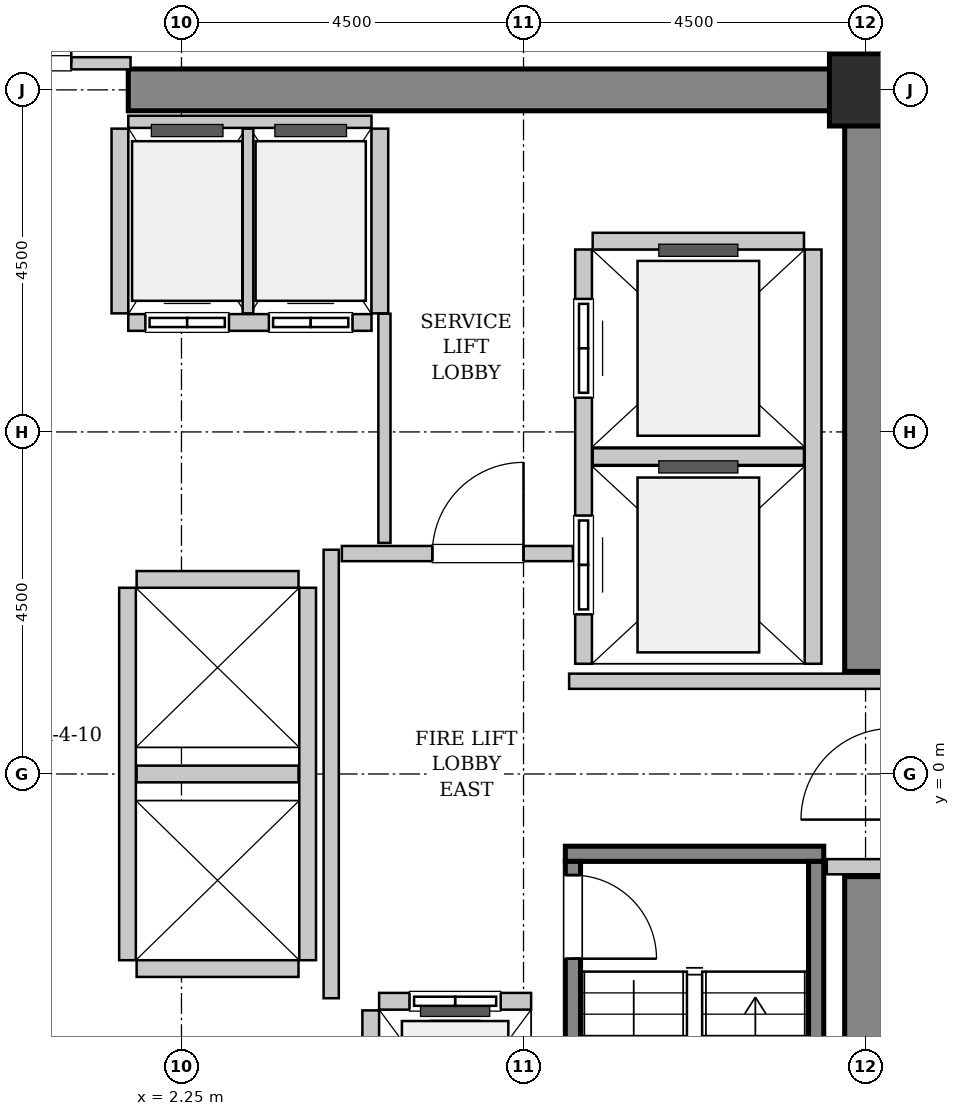
"""IFC4 building model, lengths in metres.
Left out: names, types, materials, properties, quantities, classifications, styles, units other than length and angle.
Written with IfcOpenShell. Run it as: python <this file> out.ifc"""

import sys

from ifc_helpers import new_model, si_unit, direction, frame, frame_2d, origin, origin_2d, place, context, subcontext, project, spatial, rectangle, hollow_rectangle, extrude, source, transform, mapped, element, fill, save


model = new_model("IFC4")
c1 = context("Model", 3, precision=1e-05, world=origin(), true_north=direction((0.0, 1.0)))
c2 = subcontext(c1, "Body", "Model", "MODEL_VIEW")
j1 = project(units=[si_unit("LENGTHUNIT", "METRE"), si_unit("PLANEANGLEUNIT", "RADIAN")], contexts=[c1])
p1 = place(None, origin())
s1 = spatial("IfcSite", under=j1, at=p1, CompositionType="ELEMENT")
p2 = place(p1, origin())
s2 = spatial("IfcBuilding", under=s1, at=p2, CompositionType="ELEMENT")
p3 = place(p2, frame((0.0, 0.0, 98.4)))
s3 = spatial("IfcBuildingStorey", under=s2, at=p3, CompositionType="ELEMENT", Elevation=98.4)
m1 = source(origin(), c2, "Body", "SweptSolid", [
    extrude(rectangle(XDim=9.975, YDim=0.55, at=frame_2d((4.987, 0.0))), origin(), (0.0, 0.0, 1.0), 3.8),
])
p4 = place(p3, frame((1.55, 9.0, 0.0), z_axis=(0.0, 0.0, 1.0), x_axis=(1.0, 0.0, 0.0)))
e1 = element("IfcWall", 1, at=p4, inside=s3, PredefinedType="SHEAR", context=c2, shape_type="MappedRepresentation", body=[
    mapped(m1, transform((0.0, 0.0, 0.0), x_axis=(1.0, 0.0, 0.0), y_axis=(0.0, 1.0, 0.0), z_axis=(0.0, 0.0, 1.0), scale=1.0)),
])
m2 = source(origin(), c2, "Body", "SweptSolid", [
    extrude(rectangle(XDim=7.375, YDim=0.55, at=frame_2d((3.688, 0.0))), origin(), (0.0, 0.0, 1.0), 3.8),
])
for number, where, z_axis, x_axis in (
    (2, (11.25, -8.725, 0.0), (0.0, 0.0, 1.0), (0.0, 1.0, 0.0)),
    (3, (11.25, 1.35, 0.0), (0.0, 0.0, 1.0), (0.0, 1.0, 0.0)),
):
    element("IfcWall", number, at=place(p3, frame(where, z_axis=z_axis, x_axis=x_axis)), inside=s3, PredefinedType="SHEAR", context=c2, shape_type="MappedRepresentation", body=[
        mapped(m2, transform((0.0, 0.0, 0.0), x_axis=(1.0, 0.0, 0.0), y_axis=(0.0, 1.0, 0.0), z_axis=(0.0, 0.0, 1.0), scale=1.0)),
    ])
m3 = source(origin(), c2, "Body", "SweptSolid", [
    extrude(hollow_rectangle(XDim=0.95, YDim=0.95, WallThickness=0.045, InnerFilletRadius=0.045, OuterFilletRadius=0.09, at=origin_2d()), origin(), (0.0, 0.0, 1.0), 3.8),
])
p5 = place(p3, frame((11.25, 9.0, 0.0), z_axis=(0.0, 0.0, 1.0), x_axis=(1.0, 0.0, 0.0)))
e4 = element("IfcColumn", 4, at=p5, inside=s3, PredefinedType="COLUMN", context=c2, shape_type="MappedRepresentation", body=[
    mapped(m3, transform((0.0, 0.0, 0.0), x_axis=(1.0, 0.0, 0.0), y_axis=(0.0, 1.0, 0.0), z_axis=(0.0, 0.0, 1.0), scale=1.0)),
])
m4 = source(origin(), c2, "Body", "SweptSolid", [
    extrude(rectangle(XDim=3.4, YDim=0.2, at=frame_2d((1.7, 0.0))), origin(), (0.0, 0.0, 1.0), 3.8),
])
p6 = place(p3, frame((7.3, -1.05, 0.0), z_axis=(0.0, 0.0, 1.0), x_axis=(1.0, 0.0, 0.0)))
e5 = element("IfcWall", 5, at=p6, inside=s3, PredefinedType="SOLIDWALL", context=c2, shape_type="MappedRepresentation", body=[
    mapped(m4, transform((0.0, 0.0, 0.0), x_axis=(1.0, 0.0, 0.0), y_axis=(0.0, 1.0, 0.0), z_axis=(0.0, 0.0, 1.0), scale=1.0)),
])
m5 = source(origin(), c2, "Body", "SweptSolid", [
    extrude(rectangle(XDim=7.1, YDim=0.2, at=frame_2d((3.55, 0.0))), origin(), (0.0, 0.0, 1.0), 3.8),
])
p7 = place(p3, frame((7.4, -1.15, 0.0), z_axis=(0.0, 0.0, 1.0), x_axis=(0.0, -1.0, 0.0)))
e6 = element("IfcWall", 6, at=p7, inside=s3, PredefinedType="SOLIDWALL", context=c2, shape_type="MappedRepresentation", body=[
    mapped(m5, transform((0.0, 0.0, 0.0), x_axis=(1.0, 0.0, 0.0), y_axis=(0.0, 1.0, 0.0), z_axis=(0.0, 0.0, 1.0), scale=1.0)),
])
p8 = place(p7, frame((0.18, 0.0, 0.0)))
e7 = element("IfcOpeningElement", 7, at=p8, cuts=e6, PredefinedType="OPENING", context=c2, shape_type="SweptSolid", body=[
    extrude(rectangle(XDim=1.1, YDim=2.15, at=frame_2d((0.55, 1.075))), frame((0.0, 0.11, 0.0), z_axis=(0.0, -1.0, 0.0), x_axis=(1.0, 0.0, 0.0)), (0.0, 0.0, 1.0), 0.22),
])
p9 = place(p3, frame((10.6, -1.15, 0.0), z_axis=(0.0, 0.0, 1.0), x_axis=(0.0, -1.0, 0.0)))
e8 = element("IfcWall", 8, at=p9, inside=s3, PredefinedType="SOLIDWALL", context=c2, shape_type="MappedRepresentation", body=[
    mapped(m5, transform((0.0, 0.0, 0.0), x_axis=(1.0, 0.0, 0.0), y_axis=(0.0, 1.0, 0.0), z_axis=(0.0, 0.0, 1.0), scale=1.0)),
])
m6 = source(origin(), c2, "Body", "SweptSolid", [
    extrude(rectangle(XDim=2.0, YDim=0.22, at=frame_2d((1.0, 0.0))), origin(), (0.0, 0.0, 1.0), 3.535),
])
p10 = place(p3, frame((6.85, -2.99, 0.0), z_axis=(0.0, 0.0, 1.0), x_axis=(-1.0, 0.0, 0.0)))
e9 = element("IfcWall", 9, at=p10, inside=s3, PredefinedType="SOLIDWALL", context=c2, shape_type="MappedRepresentation", body=[
    mapped(m6, transform((0.0, 0.0, 0.0), x_axis=(1.0, 0.0, 0.0), y_axis=(0.0, 1.0, 0.0), z_axis=(0.0, 0.0, 1.0), scale=1.0)),
])
p11 = place(p10, frame((0.4, 0.0, 0.0)))
e10 = element("IfcOpeningElement", 10, at=p11, cuts=e9, PredefinedType="OPENING", context=c2, shape_type="SweptSolid", body=[
    extrude(rectangle(XDim=1.2, YDim=2.2, at=frame_2d((0.6, 1.1))), frame((0.0, 0.12, 0.0), z_axis=(0.0, -1.0, 0.0), x_axis=(1.0, 0.0, 0.0)), (0.0, 0.0, 1.0), 0.24),
])
m7 = source(origin(), c2, "Body", "SweptSolid", [
    extrude(rectangle(XDim=2.68, YDim=0.22, at=frame_2d((1.34, 0.0))), origin(), (0.0, 0.0, 1.0), 3.535),
])
p12 = place(p3, frame((4.74, -3.11, 0.0), z_axis=(0.0, 0.0, 1.0), x_axis=(0.0, -1.0, 0.0)))
e11 = element("IfcWall", 11, at=p12, inside=s3, PredefinedType="SOLIDWALL", context=c2, shape_type="MappedRepresentation", body=[
    mapped(m7, transform((0.0, 0.0, 0.0), x_axis=(1.0, 0.0, 0.0), y_axis=(0.0, 1.0, 0.0), z_axis=(0.0, 0.0, 1.0), scale=1.0)),
])
m8 = source(origin(), c2, "Body", "SweptSolid", [
    extrude(rectangle(XDim=5.45, YDim=0.22, at=frame_2d((2.725, 0.0))), origin(), (0.0, 0.0, 1.0), 3.535),
])
p13 = place(p3, frame((7.54, 6.9, 0.0), z_axis=(0.0, 0.0, 1.0), x_axis=(0.0, -1.0, 0.0)))
e12 = element("IfcWall", 12, at=p13, inside=s3, PredefinedType="SOLIDWALL", context=c2, shape_type="MappedRepresentation", body=[
    mapped(m8, transform((0.0, 0.0, 0.0), x_axis=(1.0, 0.0, 0.0), y_axis=(0.0, 1.0, 0.0), z_axis=(0.0, 0.0, 1.0), scale=1.0)),
])
p14 = place(p13, frame((3.5, 0.0, 0.0)))
e13 = element("IfcOpeningElement", 13, at=p14, cuts=e12, PredefinedType="OPENING", context=c2, shape_type="SweptSolid", body=[
    extrude(rectangle(XDim=1.3, YDim=2.3, at=frame_2d((0.65, 1.15))), frame((0.0, 0.12, 0.0), z_axis=(0.0, -1.0, 0.0), x_axis=(1.0, 0.0, 0.0)), (0.0, 0.0, 1.0), 0.24),
])
p15 = place(p13, frame((0.65, 0.0, 0.0)))
e14 = element("IfcOpeningElement", 14, at=p15, cuts=e12, PredefinedType="OPENING", context=c2, shape_type="SweptSolid", body=[
    extrude(rectangle(XDim=1.3, YDim=2.3, at=frame_2d((0.65, 1.15))), frame((0.0, 0.12, 0.0), z_axis=(0.0, -1.0, 0.0), x_axis=(1.0, 0.0, 0.0)), (0.0, 0.0, 1.0), 0.24),
])
p16 = place(p3, frame((10.56, 1.45, 0.0), z_axis=(0.0, 0.0, 1.0), x_axis=(0.0, 1.0, 0.0)))
e15 = element("IfcWall", 15, at=p16, inside=s3, PredefinedType="SOLIDWALL", context=c2, shape_type="MappedRepresentation", body=[
    mapped(m8, transform((0.0, 0.0, 0.0), x_axis=(1.0, 0.0, 0.0), y_axis=(0.0, 1.0, 0.0), z_axis=(0.0, 0.0, 1.0), scale=1.0)),
])
m9 = source(origin(), c2, "Body", "SweptSolid", [
    extrude(rectangle(XDim=2.78, YDim=0.22, at=frame_2d((1.39, 0.0))), origin(), (0.0, 0.0, 1.0), 3.535),
])
for number, where, z_axis, x_axis in (
    (16, (7.66, 4.175, 0.0), (0.0, 0.0, 1.0), (1.0, 0.0, 0.0)),
    (17, (10.44, 7.01, 0.0), (0.0, 0.0, 1.0), (-1.0, 0.0, 0.0)),
):
    element("IfcWall", number, at=place(p3, frame(where, z_axis=z_axis, x_axis=x_axis)), inside=s3, PredefinedType="SOLIDWALL", context=c2, shape_type="MappedRepresentation", body=[
        mapped(m9, transform((0.0, 0.0, 0.0), x_axis=(1.0, 0.0, 0.0), y_axis=(0.0, 1.0, 0.0), z_axis=(0.0, 0.0, 1.0), scale=1.0)),
    ])
m10 = source(origin(), c2, "Body", "SweptSolid", [
    extrude(rectangle(XDim=3.2, YDim=0.22, at=frame_2d((1.6, 0.0))), origin(), (0.0, 0.0, 1.0), 3.535),
])
p17 = place(p3, frame((1.55, 5.94, 0.0), z_axis=(0.0, 0.0, 1.0), x_axis=(1.0, 0.0, 0.0)))
e18 = element("IfcWall", 18, at=p17, inside=s3, PredefinedType="SOLIDWALL", context=c2, shape_type="MappedRepresentation", body=[
    mapped(m10, transform((0.0, 0.0, 0.0), x_axis=(1.0, 0.0, 0.0), y_axis=(0.0, 1.0, 0.0), z_axis=(0.0, 0.0, 1.0), scale=1.0)),
])
p18 = place(p17, frame((0.225, 0.0, 0.0)))
e19 = element("IfcOpeningElement", 19, at=p18, cuts=e18, PredefinedType="OPENING", context=c2, shape_type="SweptSolid", body=[
    extrude(rectangle(XDim=1.1, YDim=2.2, at=frame_2d((0.55, 1.1))), frame((0.0, 0.12, 0.0), z_axis=(0.0, -1.0, 0.0), x_axis=(1.0, 0.0, 0.0)), (0.0, 0.0, 1.0), 0.24),
])
p19 = place(p17, frame((1.85, 0.0, 0.0)))
e20 = element("IfcOpeningElement", 20, at=p19, cuts=e18, PredefinedType="OPENING", context=c2, shape_type="SweptSolid", body=[
    extrude(rectangle(XDim=1.1, YDim=2.2, at=frame_2d((0.55, 1.1))), frame((0.0, 0.12, 0.0), z_axis=(0.0, -1.0, 0.0), x_axis=(1.0, 0.0, 0.0)), (0.0, 0.0, 1.0), 0.24),
])
m11 = source(origin(), c2, "Body", "SweptSolid", [
    extrude(rectangle(XDim=3.2, YDim=0.16, at=frame_2d((1.6, 0.0))), origin(), (0.0, 0.0, 1.0), 2.425),
])
p20 = place(p3, frame((4.75, 8.58, 0.0), z_axis=(0.0, 0.0, 1.0), x_axis=(-1.0, 0.0, 0.0)))
e21 = element("IfcWall", 21, at=p20, inside=s3, PredefinedType="PARTITIONING", context=c2, shape_type="MappedRepresentation", body=[
    mapped(m11, transform((0.0, 0.0, 0.0), x_axis=(1.0, 0.0, 0.0), y_axis=(0.0, 1.0, 0.0), z_axis=(0.0, 0.0, 1.0), scale=1.0)),
])
m12 = source(origin(), c2, "Body", "SweptSolid", [
    extrude(rectangle(XDim=2.43, YDim=0.22, at=frame_2d((1.215, 0.0))), origin(), (0.0, 0.0, 1.0), 3.535),
])
p21 = place(p3, frame((1.44, 8.49, 0.0), z_axis=(0.0, 0.0, 1.0), x_axis=(0.0, -1.0, 0.0)))
e22 = element("IfcWall", 22, at=p21, inside=s3, PredefinedType="SOLIDWALL", context=c2, shape_type="MappedRepresentation", body=[
    mapped(m12, transform((0.0, 0.0, 0.0), x_axis=(1.0, 0.0, 0.0), y_axis=(0.0, 1.0, 0.0), z_axis=(0.0, 0.0, 1.0), scale=1.0)),
])
m13 = source(origin(), c2, "Body", "SweptSolid", [
    extrude(rectangle(XDim=2.43, YDim=0.14, at=frame_2d((1.215, 0.0))), origin(), (0.0, 0.0, 1.0), 3.535),
])
p22 = place(p3, frame((3.125, 6.06, 0.0), z_axis=(0.0, 0.0, 1.0), x_axis=(0.0, 1.0, 0.0)))
e23 = element("IfcWall", 23, at=p22, inside=s3, PredefinedType="PARTITIONING", context=c2, shape_type="MappedRepresentation", body=[
    mapped(m13, transform((0.0, 0.0, 0.0), x_axis=(1.0, 0.0, 0.0), y_axis=(0.0, 1.0, 0.0), z_axis=(0.0, 0.0, 1.0), scale=1.0)),
])
p23 = place(p3, frame((4.86, 6.06, 0.0), z_axis=(0.0, 0.0, 1.0), x_axis=(0.0, 1.0, 0.0)))
e24 = element("IfcWall", 24, at=p23, inside=s3, PredefinedType="SOLIDWALL", context=c2, shape_type="MappedRepresentation", body=[
    mapped(m12, transform((0.0, 0.0, 0.0), x_axis=(1.0, 0.0, 0.0), y_axis=(0.0, 1.0, 0.0), z_axis=(0.0, 0.0, 1.0), scale=1.0)),
])
m14 = source(origin(), c2, "Body", "SweptSolid", [
    extrude(rectangle(XDim=4.9, YDim=0.22, at=frame_2d((2.45, 0.0))), origin(), (0.0, 0.0, 1.0), 3.535),
])
for number, where, z_axis, x_axis in (
    (25, (1.54, 2.45, 0.0), (0.0, 0.0, 1.0), (0.0, -1.0, 0.0)),
    (26, (3.91, -2.45, 0.0), (0.0, 0.0, 1.0), (0.0, 1.0, 0.0)),
):
    element("IfcWall", number, at=place(p3, frame(where, z_axis=z_axis, x_axis=x_axis)), inside=s3, PredefinedType="SOLIDWALL", context=c2, shape_type="MappedRepresentation", body=[
        mapped(m14, transform((0.0, 0.0, 0.0), x_axis=(1.0, 0.0, 0.0), y_axis=(0.0, 1.0, 0.0), z_axis=(0.0, 0.0, 1.0), scale=1.0)),
    ])
m15 = source(origin(), c2, "Body", "SweptSolid", [
    extrude(rectangle(XDim=2.13, YDim=0.22, at=frame_2d((1.065, 0.0))), origin(), (0.0, 0.0, 1.0), 3.535),
])
for number, where, z_axis, x_axis in (
    (27, (1.66, -2.56, 0.0), (0.0, 0.0, 1.0), (1.0, 0.0, 0.0)),
    (28, (1.66, 0.0, 0.0), (0.0, 0.0, 1.0), (1.0, 0.0, 0.0)),
    (29, (3.79, 2.56, 0.0), (0.0, 0.0, 1.0), (-1.0, 0.0, 0.0)),
):
    element("IfcWall", number, at=place(p3, frame(where, z_axis=z_axis, x_axis=x_axis)), inside=s3, PredefinedType="SOLIDWALL", context=c2, shape_type="MappedRepresentation", body=[
        mapped(m15, transform((0.0, 0.0, 0.0), x_axis=(1.0, 0.0, 0.0), y_axis=(0.0, 1.0, 0.0), z_axis=(0.0, 0.0, 1.0), scale=1.0)),
    ])
m16 = source(origin(), c2, "Body", "SweptSolid", [
    extrude(rectangle(XDim=5.9, YDim=0.2, at=frame_2d((2.95, 0.0))), origin(), (0.0, 0.0, 1.0), 3.535),
])
p24 = place(p3, frame((4.22, -2.95, 0.0), z_axis=(0.0, 0.0, 1.0), x_axis=(0.0, 1.0, 0.0)))
e30 = element("IfcWall", 30, at=p24, inside=s3, PredefinedType="PARTITIONING", context=c2, shape_type="MappedRepresentation", body=[
    mapped(m16, transform((0.0, 0.0, 0.0), x_axis=(1.0, 0.0, 0.0), y_axis=(0.0, 1.0, 0.0), z_axis=(0.0, 0.0, 1.0), scale=1.0)),
])
m17 = source(origin(), c2, "Body", "SweptSolid", [
    extrude(rectangle(XDim=3.04, YDim=0.2, at=frame_2d((1.52, 0.0))), origin(), (0.0, 0.0, 1.0), 3.535),
])
p25 = place(p3, frame((4.36, 2.9, 0.0), z_axis=(0.0, 0.0, 1.0), x_axis=(1.0, 0.0, 0.0)))
e31 = element("IfcWall", 31, at=p25, inside=s3, PredefinedType="PARTITIONING", context=c2, shape_type="MappedRepresentation", body=[
    mapped(m17, transform((0.0, 0.0, 0.0), x_axis=(1.0, 0.0, 0.0), y_axis=(0.0, 1.0, 0.0), z_axis=(0.0, 0.0, 1.0), scale=1.0)),
])
p26 = place(p25, frame((1.19, 0.0, 0.0)))
e32 = element("IfcOpeningElement", 32, at=p26, cuts=e31, PredefinedType="OPENING", context=c2, shape_type="SweptSolid", body=[
    extrude(rectangle(XDim=1.2, YDim=2.15, at=frame_2d((0.6, 1.075))), frame((0.0, 0.11, 0.0), z_axis=(0.0, -1.0, 0.0), x_axis=(1.0, 0.0, 0.0)), (0.0, 0.0, 1.0), 0.22),
])
m18 = source(origin(), c2, "Body", "SweptSolid", [
    extrude(rectangle(XDim=4.11, YDim=0.2, at=frame_2d((2.055, 0.0))), origin(), (0.0, 0.0, 1.0), 3.535),
])
p27 = place(p3, frame((7.35, 1.22, 0.0), z_axis=(0.0, 0.0, 1.0), x_axis=(1.0, 0.0, 0.0)))
e33 = element("IfcWall", 33, at=p27, inside=s3, PredefinedType="PARTITIONING", context=c2, shape_type="MappedRepresentation", body=[
    mapped(m18, transform((0.0, 0.0, 0.0), x_axis=(1.0, 0.0, 0.0), y_axis=(0.0, 1.0, 0.0), z_axis=(0.0, 0.0, 1.0), scale=1.0)),
])
m19 = source(origin(), c2, "Body", "SweptSolid", [
    extrude(rectangle(XDim=0.72, YDim=0.2, at=frame_2d((0.36, 0.0))), origin(), (0.0, 0.0, 1.0), 3.535),
])
p28 = place(p3, frame((10.74, -1.22, 0.0), z_axis=(0.0, 0.0, 1.0), x_axis=(1.0, 0.0, 0.0)))
e34 = element("IfcWall", 34, at=p28, inside=s3, PredefinedType="PARTITIONING", context=c2, shape_type="MappedRepresentation", body=[
    mapped(m19, transform((0.0, 0.0, 0.0), x_axis=(1.0, 0.0, 0.0), y_axis=(0.0, 1.0, 0.0), z_axis=(0.0, 0.0, 1.0), scale=1.0)),
])
m20 = source(origin(), c2, "Body", "SweptSolid", [
    extrude(rectangle(XDim=3.16, YDim=0.16, at=frame_2d((1.58, 0.0))), origin(), (0.0, 0.0, 1.0), 2.425),
])
p29 = place(p3, frame((-1.58, 9.35, 0.0), z_axis=(0.0, 0.0, 1.0), x_axis=(1.0, 0.0, 0.0)))
e35 = element("IfcWall", 35, at=p29, inside=s3, PredefinedType="PARTITIONING", context=c2, shape_type="MappedRepresentation", body=[
    mapped(m20, transform((0.0, 0.0, 0.0), x_axis=(1.0, 0.0, 0.0), y_axis=(0.0, 1.0, 0.0), z_axis=(0.0, 0.0, 1.0), scale=1.0)),
])
p30 = place(p29, frame((0.78, 0.0, 0.0)))
e36 = element("IfcOpeningElement", 36, at=p30, cuts=e35, PredefinedType="OPENING", context=c2, shape_type="SweptSolid", body=[
    extrude(rectangle(XDim=1.6, YDim=2.3, at=frame_2d((0.8, 1.15))), frame((0.0, 0.09, 0.0), z_axis=(0.0, -1.0, 0.0), x_axis=(1.0, 0.0, 0.0)), (0.0, 0.0, 1.0), 0.18),
])
m21 = source(origin(), c2, "Body", "SweptSolid", [
    extrude(rectangle(XDim=3.015, YDim=0.16, at=frame_2d((1.507, 0.0))), origin(), (0.0, 0.0, 1.0), 3.535),
])
p31 = place(p3, frame((4.92, 3.04, 0.0), z_axis=(0.0, 0.0, 1.0), x_axis=(0.0, 1.0, 0.0)))
e37 = element("IfcWall", 37, at=p31, inside=s3, PredefinedType="PARTITIONING", context=c2, shape_type="MappedRepresentation", body=[
    mapped(m21, transform((0.0, 0.0, 0.0), x_axis=(1.0, 0.0, 0.0), y_axis=(0.0, 1.0, 0.0), z_axis=(0.0, 0.0, 1.0), scale=1.0)),
])
m22 = source(origin(), c2, "Body", "SweptSolid", [
    extrude(rectangle(XDim=1.1, YDim=2.15, at=frame_2d((0.55, 1.075))), frame((0.0, 0.025, 0.0), z_axis=(0.0, -1.0, 0.0), x_axis=(1.0, 0.0, 0.0)), (0.0, 0.0, 1.0), 0.05),
])
p32 = place(p8, origin())
e38 = element("IfcDoor", 38, at=p32, inside=s3, OperationType="SINGLE_SWING_RIGHT", PredefinedType="DOOR", context=c2, shape_type="MappedRepresentation", body=[
    mapped(m22, transform((0.0, 0.0, 0.0), x_axis=(1.0, 0.0, 0.0), y_axis=(0.0, 1.0, 0.0), z_axis=(0.0, 0.0, 1.0), scale=1.0)),
])
fill(e7, e38)
m23 = source(origin(), c2, "Body", "SweptSolid", [
    extrude(rectangle(XDim=1.2, YDim=2.2, at=frame_2d((0.6, 1.1))), frame((0.0, 0.025, 0.0), z_axis=(0.0, -1.0, 0.0), x_axis=(1.0, 0.0, 0.0)), (0.0, 0.0, 1.0), 0.05),
])
p33 = place(p11, origin())
e39 = element("IfcDoor", 39, at=p33, inside=s3, OperationType="SLIDING_TO_LEFT", PredefinedType="DOOR", context=c2, shape_type="MappedRepresentation", body=[
    mapped(m23, transform((0.0, 0.0, 0.0), x_axis=(1.0, 0.0, 0.0), y_axis=(0.0, 1.0, 0.0), z_axis=(0.0, 0.0, 1.0), scale=1.0)),
])
fill(e10, e39)
m24 = source(origin(), c2, "Body", "SweptSolid", [
    extrude(rectangle(XDim=1.3, YDim=2.3, at=frame_2d((0.65, 1.15))), frame((0.0, 0.025, 0.0), z_axis=(0.0, -1.0, 0.0), x_axis=(1.0, 0.0, 0.0)), (0.0, 0.0, 1.0), 0.05),
])
p34 = place(p14, origin())
e40 = element("IfcDoor", 40, at=p34, inside=s3, OperationType="SLIDING_TO_RIGHT", PredefinedType="DOOR", context=c2, shape_type="MappedRepresentation", body=[
    mapped(m24, transform((0.0, 0.0, 0.0), x_axis=(1.0, 0.0, 0.0), y_axis=(0.0, 1.0, 0.0), z_axis=(0.0, 0.0, 1.0), scale=1.0)),
])
fill(e13, e40)
p35 = place(p15, origin())
e41 = element("IfcDoor", 41, at=p35, inside=s3, OperationType="SLIDING_TO_RIGHT", PredefinedType="DOOR", context=c2, shape_type="MappedRepresentation", body=[
    mapped(m24, transform((0.0, 0.0, 0.0), x_axis=(1.0, 0.0, 0.0), y_axis=(0.0, 1.0, 0.0), z_axis=(0.0, 0.0, 1.0), scale=1.0)),
])
fill(e14, e41)
m25 = source(origin(), c2, "Body", "SweptSolid", [
    extrude(rectangle(XDim=1.1, YDim=2.2, at=frame_2d((0.55, 1.1))), frame((0.0, 0.025, 0.0), z_axis=(0.0, -1.0, 0.0), x_axis=(1.0, 0.0, 0.0)), (0.0, 0.0, 1.0), 0.05),
])
p36 = place(p18, origin())
e42 = element("IfcDoor", 42, at=p36, inside=s3, OperationType="DOUBLE_DOOR_SLIDING", PredefinedType="DOOR", context=c2, shape_type="MappedRepresentation", body=[
    mapped(m25, transform((0.0, 0.0, 0.0), x_axis=(1.0, 0.0, 0.0), y_axis=(0.0, 1.0, 0.0), z_axis=(0.0, 0.0, 1.0), scale=1.0)),
])
fill(e19, e42)
p37 = place(p19, origin())
e43 = element("IfcDoor", 43, at=p37, inside=s3, OperationType="DOUBLE_DOOR_SLIDING", PredefinedType="DOOR", context=c2, shape_type="MappedRepresentation", body=[
    mapped(m25, transform((0.0, 0.0, 0.0), x_axis=(1.0, 0.0, 0.0), y_axis=(0.0, 1.0, 0.0), z_axis=(0.0, 0.0, 1.0), scale=1.0)),
])
fill(e20, e43)
m26 = source(origin(), c2, "Body", "SweptSolid", [
    extrude(rectangle(XDim=1.2, YDim=2.15, at=frame_2d((0.6, 1.075))), frame((0.0, 0.025, 0.0), z_axis=(0.0, -1.0, 0.0), x_axis=(1.0, 0.0, 0.0)), (0.0, 0.0, 1.0), 0.05),
])
p38 = place(p26, origin())
e44 = element("IfcDoor", 44, at=p38, inside=s3, OperationType="SINGLE_SWING_RIGHT", PredefinedType="DOOR", context=c2, shape_type="MappedRepresentation", body=[
    mapped(m26, transform((0.0, 0.0, 0.0), x_axis=(1.0, 0.0, 0.0), y_axis=(0.0, 1.0, 0.0), z_axis=(0.0, 0.0, 1.0), scale=1.0)),
])
fill(e32, e44)
m27 = source(origin(), c2, "Body", "SweptSolid", [
    extrude(rectangle(XDim=1.6, YDim=2.3, at=frame_2d((0.8, 1.15))), frame((0.0, 0.025, 0.0), z_axis=(0.0, -1.0, 0.0), x_axis=(1.0, 0.0, 0.0)), (0.0, 0.0, 1.0), 0.05),
])
p39 = place(p30, origin())
e45 = element("IfcDoor", 45, at=p39, inside=s3, OperationType="DOUBLE_DOOR_SINGLE_SWING", PredefinedType="DOOR", context=c2, shape_type="MappedRepresentation", body=[
    mapped(m27, transform((0.0, 0.0, 0.0), x_axis=(1.0, 0.0, 0.0), y_axis=(0.0, 1.0, 0.0), z_axis=(0.0, 0.0, 1.0), scale=1.0)),
])
fill(e36, e45)
save(model, sys.argv[1])
